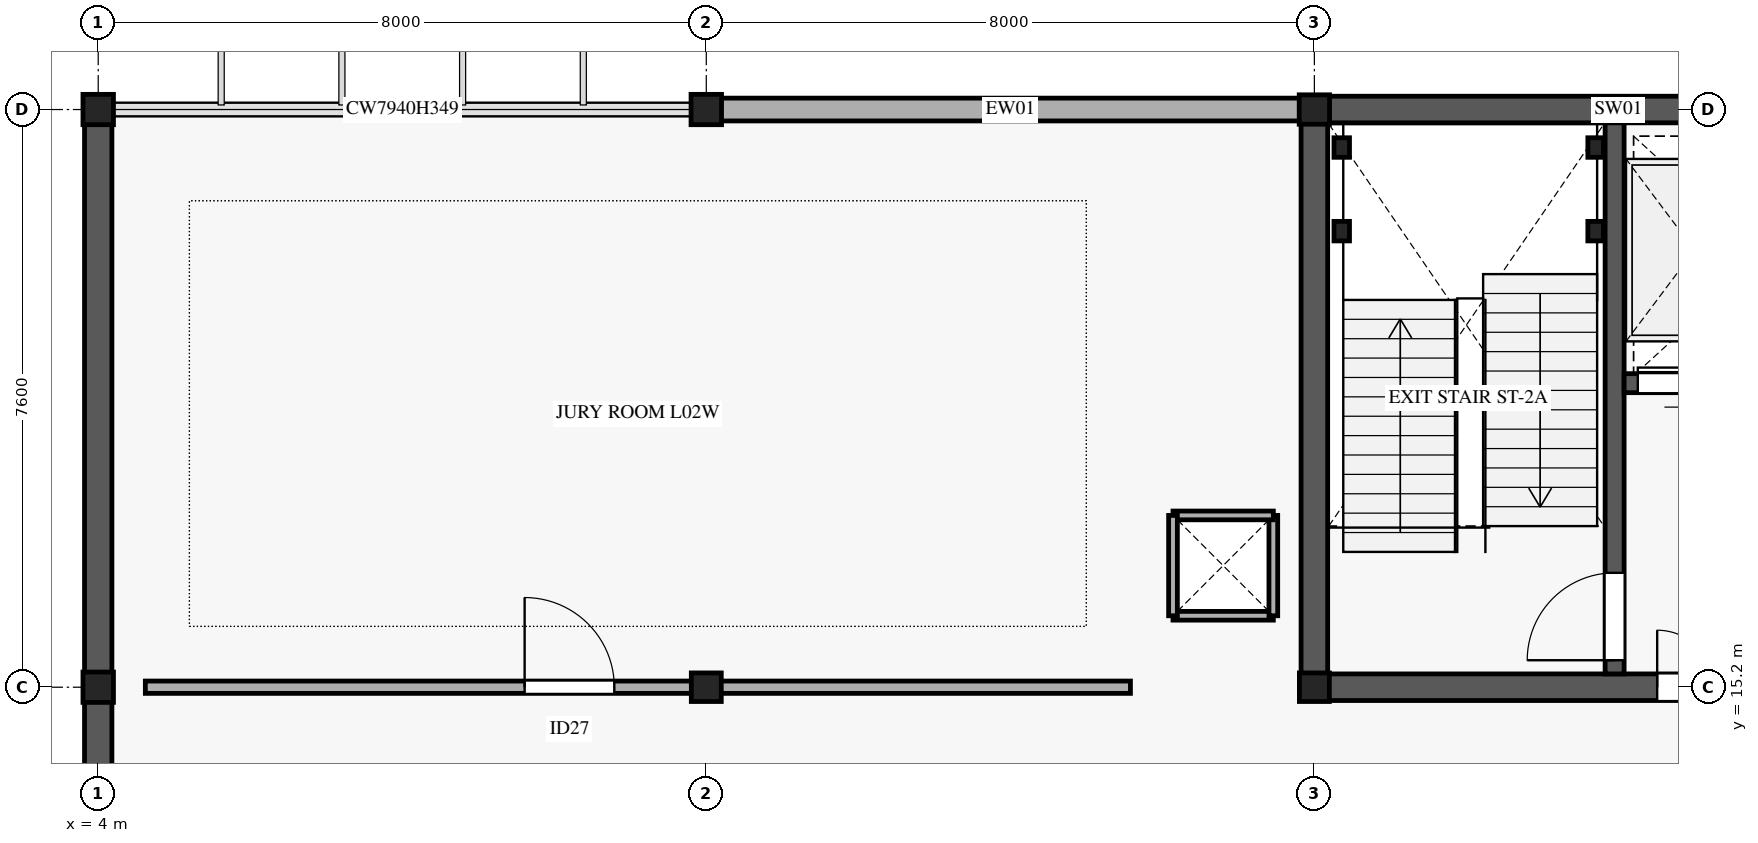
"""IFC4 building model, lengths in metres.
Left out: names, types, materials, properties, quantities, classifications, styles, units other than length and angle.
Written with IfcOpenShell. Run it as: python <this file> out.ifc"""

import sys

from ifc_helpers import new_model, si_unit, direction, frame, frame_2d, origin, origin_2d, place, context, subcontext, project, spatial, rectangle, i_section, extrude, element, fill, save


model = new_model("IFC4")
c1 = context("Model", 3, precision=1e-05, world=origin(), true_north=direction((0.0, 1.0)))
c2 = subcontext(c1, "Body", "Model", "MODEL_VIEW")
j1 = project(units=[si_unit("LENGTHUNIT", "METRE"), si_unit("PLANEANGLEUNIT", "RADIAN")], contexts=[c1])
p1 = place(None, origin())
s1 = spatial("IfcSite", under=j1, at=p1, CompositionType="ELEMENT")
p2 = place(p1, origin())
s2 = spatial("IfcBuilding", under=s1, at=p2, CompositionType="ELEMENT")
p3 = place(p2, frame((0.0, 0.0, 10.8)))
s3 = spatial("IfcBuildingStorey", under=s2, at=p3, CompositionType="ELEMENT", Elevation=10.8)
for number, where, z_axis, x_axis in (
    (1, (4.0, 15.2, 0.0), (0.0, 0.0, 1.0), (1.0, 0.0, 0.0)),
    (2, (4.0, 22.8, 0.0), (0.0, 0.0, 1.0), (1.0, 0.0, 0.0)),
):
    element("IfcColumn", number, at=place(p3, frame(where, z_axis=z_axis, x_axis=x_axis)), inside=s3, PredefinedType="COLUMN", context=c2, shape_type="SweptSolid", body=[
        extrude(i_section(OverallWidth=0.401, OverallDepth=0.399, WebThickness=0.025, FlangeThickness=0.04, FilletRadius=0.015, at=origin_2d()), origin(), (0.0, 0.0, 1.0), 4.59),
    ])
p4 = place(p3, frame((12.0, 15.2, 0.0), z_axis=(0.0, 0.0, 1.0), x_axis=(1.0, 0.0, 0.0)))
e3 = element("IfcColumn", 3, at=p4, inside=s3, PredefinedType="COLUMN", context=c2, shape_type="SweptSolid", body=[
    extrude(i_section(OverallWidth=0.394, OverallDepth=0.376, WebThickness=0.017, FlangeThickness=0.028, FilletRadius=0.015, at=origin_2d()), origin(), (0.0, 0.0, 1.0), 4.59),
])
p5 = place(p3, frame((12.0, 22.8, 0.0), z_axis=(0.0, 0.0, 1.0), x_axis=(1.0, 0.0, 0.0)))
e4 = element("IfcColumn", 4, at=p5, inside=s3, PredefinedType="COLUMN", context=c2, shape_type="SweptSolid", body=[
    extrude(i_section(OverallWidth=0.401, OverallDepth=0.399, WebThickness=0.025, FlangeThickness=0.04, FilletRadius=0.015, at=origin_2d()), origin(), (0.0, 0.0, 1.0), 4.59),
])
p6 = place(p3, frame((20.0, 15.2, 0.0), z_axis=(0.0, 0.0, 1.0), x_axis=(1.0, 0.0, 0.0)))
e5 = element("IfcColumn", 5, at=p6, inside=s3, PredefinedType="COLUMN", context=c2, shape_type="SweptSolid", body=[
    extrude(i_section(OverallWidth=0.394, OverallDepth=0.376, WebThickness=0.017, FlangeThickness=0.028, FilletRadius=0.015, at=origin_2d()), origin(), (0.0, 0.0, 1.0), 4.59),
])
p7 = place(p3, frame((20.0, 22.8, 0.0), z_axis=(0.0, 0.0, 1.0), x_axis=(1.0, 0.0, 0.0)))
e6 = element("IfcColumn", 6, at=p7, inside=s3, PredefinedType="COLUMN", context=c2, shape_type="SweptSolid", body=[
    extrude(i_section(OverallWidth=0.399, OverallDepth=0.387, WebThickness=0.021, FlangeThickness=0.033, FilletRadius=0.015, at=origin_2d()), origin(), (0.0, 0.0, 1.0), 4.59),
])
p8 = place(p3, frame((4.0, 7.58, 0.0), z_axis=(0.0, 0.0, 1.0), x_axis=(0.0, 1.0, 0.0)))
e7 = element("IfcWall", 7, at=p8, inside=s3, PredefinedType="STANDARD", context=c2, shape_type="SweptSolid", body=[
    extrude(rectangle(XDim=7.64, YDim=0.36, at=frame_2d((3.82, 0.0))), origin(), (0.0, 0.0, 1.0), 4.6),
])
p9 = place(p3, frame((4.0, 15.18, 0.0), z_axis=(0.0, 0.0, 1.0), x_axis=(0.0, 1.0, 0.0)))
e8 = element("IfcWall", 8, at=p9, inside=s3, PredefinedType="STANDARD", context=c2, shape_type="SweptSolid", body=[
    extrude(rectangle(XDim=7.64, YDim=0.36, at=frame_2d((3.82, 0.0))), origin(), (0.0, 0.0, 1.0), 4.6),
])
p10 = place(p3, frame((11.98, 22.8, 0.0), z_axis=(0.0, 0.0, 1.0), x_axis=(1.0, 0.0, 0.0)))
e9 = element("IfcWall", 9, at=p10, inside=s3, PredefinedType="STANDARD", context=c2, shape_type="SweptSolid", body=[
    extrude(rectangle(XDim=8.04, YDim=0.3, at=frame_2d((4.02, 0.0))), origin(), (0.0, 0.0, 1.0), 3.46),
])
for number, where, z_axis, x_axis in (
    (10, (18.14, 16.14, 0.0), (0.0, 0.0, 1.0), (1.0, 0.0, 0.0)),
    (11, (19.46, 16.14, 0.0), (0.0, 0.0, 1.0), (0.0, 1.0, 0.0)),
    (12, (19.46, 17.46, 0.0), (0.0, 0.0, 1.0), (-1.0, 0.0, 0.0)),
    (13, (18.14, 17.46, 0.0), (0.0, 0.0, 1.0), (0.0, -1.0, 0.0)),
):
    element("IfcWall", number, at=place(p3, frame(where, z_axis=z_axis, x_axis=x_axis)), inside=s3, PredefinedType="PARTITIONING", context=c2, shape_type="SweptSolid", body=[
        extrude(rectangle(XDim=1.32, YDim=0.115, at=frame_2d((0.66, 0.0))), origin(), (0.0, 0.0, 1.0), 3.75),
    ])
p11 = place(p3, frame((19.825, 15.2, 0.0), z_axis=(0.0, 0.0, 1.0), x_axis=(1.0, 0.0, 0.0)))
e14 = element("IfcWall", 14, at=p11, inside=s3, PredefinedType="SHEAR", context=c2, shape_type="SweptSolid", body=[
    extrude(rectangle(XDim=8.35, YDim=0.35, at=frame_2d((4.175, 0.0))), origin(), (0.0, 0.0, 1.0), 4.59),
])
p12 = place(p11, frame((4.685, 0.0, 0.0)))
e15 = element("IfcOpeningElement", 15, at=p12, cuts=e14, PredefinedType="OPENING", context=c2, shape_type="SweptSolid", body=[
    extrude(rectangle(XDim=1.5, YDim=2.2, at=frame_2d((0.75, 1.1))), frame((0.0, 0.185, 0.0), z_axis=(0.0, -1.0, 0.0), x_axis=(1.0, 0.0, 0.0)), (0.0, 0.0, 1.0), 0.37),
])
p13 = place(p3, frame((19.825, 22.8, 0.0), z_axis=(0.0, 0.0, 1.0), x_axis=(1.0, 0.0, 0.0)))
e16 = element("IfcWall", 16, at=p13, inside=s3, PredefinedType="SHEAR", context=c2, shape_type="SweptSolid", body=[
    extrude(rectangle(XDim=8.35, YDim=0.35, at=frame_2d((4.175, 0.0))), origin(), (0.0, 0.0, 1.0), 4.59),
])
p14 = place(p3, frame((20.0, 15.375, 0.0), z_axis=(0.0, 0.0, 1.0), x_axis=(0.0, 1.0, 0.0)))
e17 = element("IfcWall", 17, at=p14, inside=s3, PredefinedType="SHEAR", context=c2, shape_type="SweptSolid", body=[
    extrude(rectangle(XDim=7.25, YDim=0.35, at=frame_2d((3.625, 0.0))), origin(), (0.0, 0.0, 1.0), 4.59),
])
p15 = place(p3, frame((23.95, 15.375, 0.0), z_axis=(0.0, 0.0, 1.0), x_axis=(0.0, 1.0, 0.0)))
e18 = element("IfcWall", 18, at=p15, inside=s3, PredefinedType="SHEAR", context=c2, shape_type="SweptSolid", body=[
    extrude(rectangle(XDim=7.25, YDim=0.25, at=frame_2d((3.625, 0.0))), origin(), (0.0, 0.0, 1.0), 4.59),
])
p16 = place(p15, frame((0.18, 0.0, 0.0)))
e19 = element("IfcOpeningElement", 19, at=p16, cuts=e18, PredefinedType="OPENING", context=c2, shape_type="SweptSolid", body=[
    extrude(rectangle(XDim=1.15, YDim=2.2, at=frame_2d((0.575, 1.1))), frame((0.0, 0.135, 0.0), z_axis=(0.0, -1.0, 0.0), x_axis=(1.0, 0.0, 0.0)), (0.0, 0.0, 1.0), 0.27),
])
p17 = place(p3, frame((24.075, 19.2, 0.0), z_axis=(0.0, 0.0, 1.0), x_axis=(1.0, 0.0, 0.0)))
e20 = element("IfcWall", 20, at=p17, inside=s3, PredefinedType="SHEAR", context=c2, shape_type="SweptSolid", body=[
    extrude(rectangle(XDim=3.75, YDim=0.25, at=frame_2d((1.875, 0.0))), origin(), (0.0, 0.0, 1.0), 4.59),
])
p18 = place(p17, frame((0.18, 0.0, 0.0)))
e21 = element("IfcOpeningElement", 21, at=p18, cuts=e20, PredefinedType="OPENING", context=c2, shape_type="SweptSolid", body=[
    extrude(rectangle(XDim=1.2, YDim=2.2, at=frame_2d((0.6, 1.1))), frame((0.0, 0.135, 0.0), z_axis=(0.0, -1.0, 0.0), x_axis=(1.0, 0.0, 0.0)), (0.0, 0.0, 1.0), 0.27),
])
p19 = place(p17, frame((1.55, 0.0, 0.0)))
e22 = element("IfcOpeningElement", 22, at=p19, cuts=e20, PredefinedType="OPENING", context=c2, shape_type="SweptSolid", body=[
    extrude(rectangle(XDim=1.05, YDim=2.2, at=frame_2d((0.525, 1.1))), frame((0.0, 0.135, 0.0), z_axis=(0.0, -1.0, 0.0), x_axis=(1.0, 0.0, 0.0)), (0.0, 0.0, 1.0), 0.27),
])
for number, where, z_axis, x_axis in (
    (23, (20.36, 21.2, 0.0), (0.0, 0.0, 1.0), (1.0, 0.0, 0.0)),
    (24, (23.7, 21.2, 0.0), (0.0, 0.0, 1.0), (1.0, 0.0, 0.0)),
    (25, (20.36, 22.3, 0.0), (0.0, 0.0, 1.0), (1.0, 0.0, 0.0)),
    (26, (23.7, 22.3, 0.0), (0.0, 0.0, 1.0), (1.0, 0.0, 0.0)),
):
    element("IfcColumn", number, at=place(p3, frame(where, z_axis=z_axis, x_axis=x_axis)), inside=s3, PredefinedType="COLUMN", context=c2, shape_type="SweptSolid", body=[
        extrude(i_section(OverallWidth=0.204, OverallDepth=0.257, WebThickness=0.009, FlangeThickness=0.016, FilletRadius=0.013, at=origin_2d()), origin(), (0.0, 0.0, 1.0), 4.795),
    ])
p20 = place(p3, frame((4.62, 15.2, 0.0), z_axis=(0.0, 0.0, 1.0), x_axis=(1.0, 0.0, 0.0)))
e27 = element("IfcWall", 27, at=p20, inside=s3, PredefinedType="PARTITIONING", context=c2, shape_type="SweptSolid", body=[
    extrude(rectangle(XDim=12.96, YDim=0.162, at=frame_2d((6.48, 0.0))), origin(), (0.0, 0.0, 1.0), 3.45),
])
p21 = place(p20, frame((4.99, 0.0, 0.0)))
e28 = element("IfcOpeningElement", 28, at=p21, cuts=e27, PredefinedType="OPENING", context=c2, shape_type="SweptSolid", body=[
    extrude(rectangle(XDim=1.18, YDim=2.3, at=frame_2d((0.59, 1.15))), frame((0.0, 0.091, 0.0), z_axis=(0.0, -1.0, 0.0), x_axis=(1.0, 0.0, 0.0)), (0.0, 0.0, 1.0), 0.182),
])
p22 = place(p16, origin())
e29 = element("IfcDoor", 29, at=p22, inside=s3, OperationType="SINGLE_SWING_LEFT", PredefinedType="DOOR", context=c2, shape_type="SweptSolid", body=[
    extrude(rectangle(XDim=1.15, YDim=2.2, at=frame_2d((0.575, 1.1))), frame((0.0, 0.025, 0.0), z_axis=(0.0, -1.0, 0.0), x_axis=(1.0, 0.0, 0.0)), (0.0, 0.0, 1.0), 0.05),
])
fill(e19, e29)
p23 = place(p12, origin())
e30 = element("IfcDoor", 30, at=p23, inside=s3, OperationType="DOUBLE_DOOR_SINGLE_SWING", PredefinedType="DOOR", context=c2, shape_type="SweptSolid", body=[
    extrude(rectangle(XDim=1.5, YDim=2.2, at=frame_2d((0.75, 1.1))), frame((0.0, 0.025, 0.0), z_axis=(0.0, -1.0, 0.0), x_axis=(1.0, 0.0, 0.0)), (0.0, 0.0, 1.0), 0.05),
])
fill(e15, e30)
p24 = place(p18, origin())
e31 = element("IfcDoor", 31, at=p24, inside=s3, OperationType="SLIDING_TO_LEFT", PredefinedType="DOOR", context=c2, shape_type="SweptSolid", body=[
    extrude(rectangle(XDim=1.2, YDim=2.2, at=frame_2d((0.6, 1.1))), frame((0.0, 0.025, 0.0), z_axis=(0.0, -1.0, 0.0), x_axis=(1.0, 0.0, 0.0)), (0.0, 0.0, 1.0), 0.05),
])
fill(e21, e31)
p25 = place(p21, origin())
e32 = element("IfcDoor", 32, at=p25, inside=s3, OperationType="SINGLE_SWING_LEFT", PredefinedType="DOOR", context=c2, shape_type="SweptSolid", body=[
    extrude(rectangle(XDim=1.18, YDim=2.3, at=frame_2d((0.59, 1.15))), frame((0.0, 0.025, 0.0), z_axis=(0.0, -1.0, 0.0), x_axis=(1.0, 0.0, 0.0)), (0.0, 0.0, 1.0), 0.05),
])
fill(e28, e32)
save(model, sys.argv[1])
